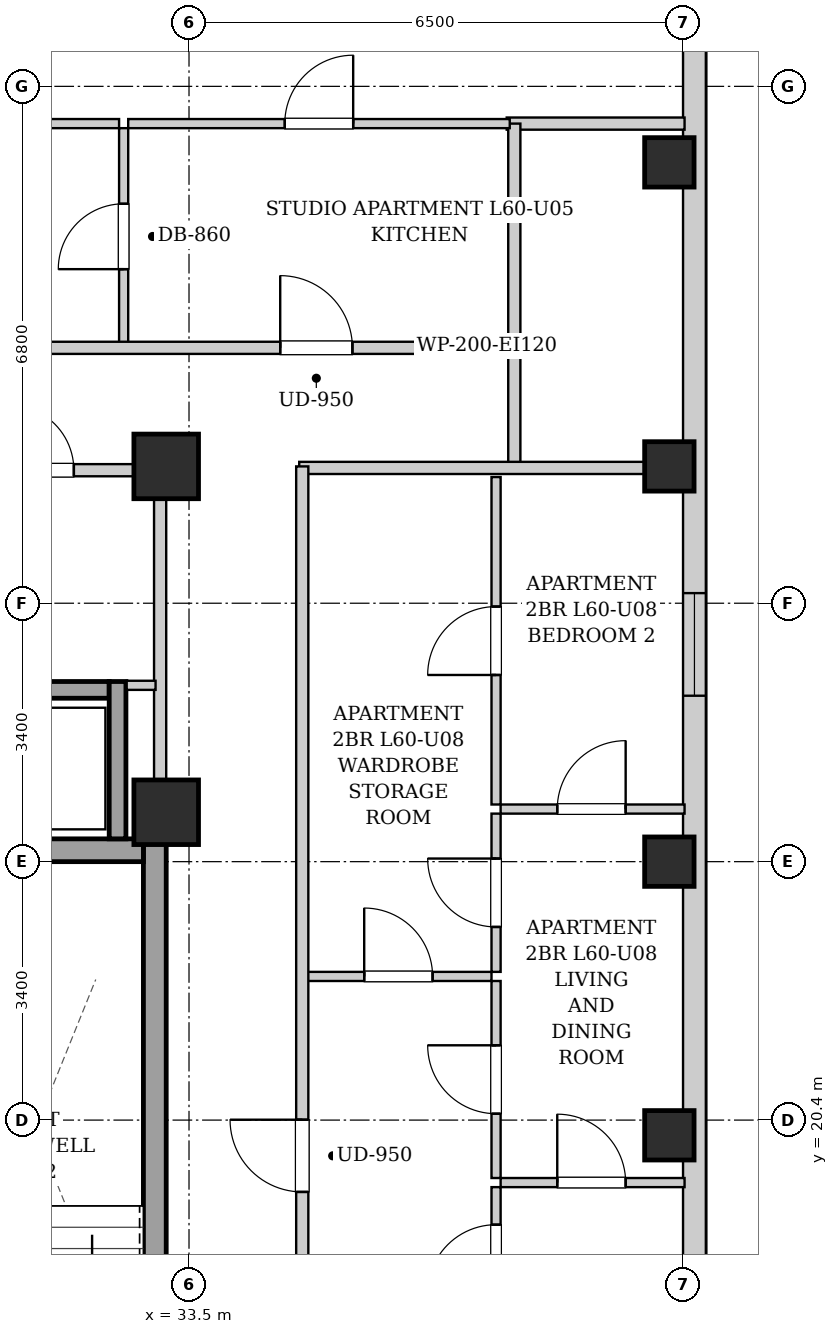
"""IFC4 building model, lengths in metres.
Left out: names, types, materials, properties, quantities, classifications, styles, units other than length and angle.
Written with IfcOpenShell. Run it as: python <this file> out.ifc"""

import sys

from ifc_helpers import new_model, si_unit, direction, frame, frame_2d, origin, origin_2d, place, context, subcontext, project, spatial, rectangle, extrude, element, fill, save


model = new_model("IFC4")
c1 = context("Model", 3, precision=1e-05, world=origin(), true_north=direction((0.0, 1.0)))
c2 = subcontext(c1, "Body", "Model", "MODEL_VIEW")
j1 = project(units=[si_unit("LENGTHUNIT", "METRE"), si_unit("PLANEANGLEUNIT", "RADIAN")], contexts=[c1])
p1 = place(None, origin())
s1 = spatial("IfcSite", under=j1, at=p1, CompositionType="ELEMENT")
p2 = place(p1, origin())
s2 = spatial("IfcBuilding", under=s1, at=p2, CompositionType="ELEMENT")
p3 = place(p2, frame((0.0, 0.0, 207.4)))
s3 = spatial("IfcBuildingStorey", under=s2, at=p3, CompositionType="ELEMENT", Elevation=207.4)
for number, where, z_axis, x_axis in (
    (1, (39.82, 20.2, 0.0), (0.0, 0.0, 1.0), (1.0, 0.0, 0.0)),
    (2, (39.82, 23.8, 0.0), (0.0, 0.0, 1.0), (1.0, 0.0, 0.0)),
    (3, (39.82, 29.0, 0.0), (0.0, 0.0, 1.0), (1.0, 0.0, 0.0)),
    (4, (39.82, 33.0, 0.0), (0.0, 0.0, 1.0), (1.0, 0.0, 0.0)),
):
    element("IfcColumn", number, at=place(p3, frame(where, z_axis=z_axis, x_axis=x_axis)), inside=s3, PredefinedType="COLUMN", context=c2, shape_type="SweptSolid", body=[
        extrude(rectangle(XDim=0.65, YDim=0.65, at=origin_2d()), origin(), (0.0, 0.0, 1.0), 3.3),
    ])
for number, where, z_axis, x_axis in (
    (5, (33.2, 29.0, 0.0), (0.0, 0.0, 1.0), (1.0, 0.0, 0.0)),
    (6, (33.2, 24.45, 0.0), (0.0, 0.0, 1.0), (1.0, 0.0, 0.0)),
):
    element("IfcColumn", number, at=place(p3, frame(where, z_axis=z_axis, x_axis=x_axis)), inside=s3, PredefinedType="COLUMN", context=c2, shape_type="SweptSolid", body=[
        extrude(rectangle(XDim=0.85, YDim=0.85, at=origin_2d()), origin(), (0.0, 0.0, 1.0), 3.3),
    ])
p4 = place(p3, frame((40.15, 37.7, 0.0), z_axis=(0.0, 0.0, 1.0), x_axis=(0.0, -1.0, 0.0)))
e7 = element("IfcWall", 7, at=p4, inside=s3, PredefinedType="SOLIDWALL", context=c2, shape_type="SweptSolid", body=[
    extrude(rectangle(XDim=31.4, YDim=0.3, at=frame_2d((15.7, 0.0))), origin(), (0.0, 0.0, 1.0), 3.04),
])
p5 = place(p4, frame((1.504, 0.0, 0.55)))
e8 = element("IfcOpeningElement", 8, at=p5, cuts=e7, PredefinedType="OPENING", context=c2, shape_type="SweptSolid", body=[
    extrude(rectangle(XDim=1.35, YDim=1.2, at=frame_2d((0.675, 0.6))), frame((0.0, 0.16, 0.0), z_axis=(0.0, -1.0, 0.0), x_axis=(1.0, 0.0, 0.0)), (0.0, 0.0, 1.0), 0.32),
])
p6 = place(p4, frame((19.683, 0.0, 0.55)))
e9 = element("IfcOpeningElement", 9, at=p6, cuts=e7, PredefinedType="OPENING", context=c2, shape_type="SweptSolid", body=[
    extrude(rectangle(XDim=1.35, YDim=1.2, at=frame_2d((0.675, 0.6))), frame((0.0, 0.16, 0.0), z_axis=(0.0, -1.0, 0.0), x_axis=(1.0, 0.0, 0.0)), (0.0, 0.0, 1.0), 0.32),
])
p7 = place(p4, frame((10.367, 0.0, 0.55)))
e10 = element("IfcOpeningElement", 10, at=p7, cuts=e7, PredefinedType="OPENING", context=c2, shape_type="SweptSolid", body=[
    extrude(rectangle(XDim=1.35, YDim=1.2, at=frame_2d((0.675, 0.6))), frame((0.0, 0.16, 0.0), z_axis=(0.0, -1.0, 0.0), x_axis=(1.0, 0.0, 0.0)), (0.0, 0.0, 1.0), 0.32),
])
p8 = place(p3, frame((33.05, 15.1, 0.0), z_axis=(0.0, 0.0, 1.0), x_axis=(0.0, 1.0, 0.0)))
e11 = element("IfcWall", 11, at=p8, inside=s3, PredefinedType="SHEAR", context=c2, shape_type="SweptSolid", body=[
    extrude(rectangle(XDim=9.0, YDim=0.3, at=frame_2d((4.5, 0.0))), origin(), (0.0, 0.0, 1.0), 3.04),
])
p9 = place(p3, frame((30.05, 23.95, 0.0), z_axis=(0.0, 0.0, 1.0), x_axis=(1.0, 0.0, 0.0)))
e12 = element("IfcWall", 12, at=p9, inside=s3, PredefinedType="SHEAR", context=c2, shape_type="SweptSolid", body=[
    extrude(rectangle(XDim=2.85, YDim=0.3, at=frame_2d((1.425, 0.0))), origin(), (0.0, 0.0, 1.0), 3.04),
])
p10 = place(p3, frame((30.55, 26.06, 0.0), z_axis=(0.0, 0.0, 1.0), x_axis=(1.0, 0.0, 0.0)))
e13 = element("IfcWall", 13, at=p10, inside=s3, PredefinedType="SHEAR", context=c2, shape_type="SweptSolid", body=[
    extrude(rectangle(XDim=1.9, YDim=0.22, at=frame_2d((0.95, 0.0))), origin(), (0.0, 0.0, 1.0), 3.04),
])
p11 = place(p3, frame((32.56, 24.1, 0.0), z_axis=(0.0, 0.0, 1.0), x_axis=(0.0, 1.0, 0.0)))
e14 = element("IfcWall", 14, at=p11, inside=s3, PredefinedType="SHEAR", context=c2, shape_type="SweptSolid", body=[
    extrude(rectangle(XDim=2.07, YDim=0.22, at=frame_2d((1.035, 0.0))), origin(), (0.0, 0.0, 1.0), 3.04),
])
p12 = place(p3, frame((33.12, 24.12, 0.0), z_axis=(0.0, 0.0, 1.0), x_axis=(0.0, 1.0, 0.0)))
e15 = element("IfcWall", 15, at=p12, inside=s3, PredefinedType="PARTITIONING", context=c2, shape_type="SweptSolid", body=[
    extrude(rectangle(XDim=4.76, YDim=0.16, at=frame_2d((2.38, 0.0))), origin(), (0.0, 0.0, 1.0), 2.375),
])
p13 = place(p3, frame((32.68, 26.12, 0.0), z_axis=(0.0, 0.0, 1.0), x_axis=(1.0, 0.0, 0.0)))
e16 = element("IfcWall", 16, at=p13, inside=s3, PredefinedType="PARTITIONING", context=c2, shape_type="SweptSolid", body=[
    extrude(rectangle(XDim=0.38, YDim=0.12, at=frame_2d((0.19, 0.0))), origin(), (0.0, 0.0, 1.0), 3.04),
])
p14 = place(p3, frame((30.08, 28.95, 0.0), z_axis=(0.0, 0.0, 1.0), x_axis=(1.0, 0.0, 0.0)))
e17 = element("IfcWall", 17, at=p14, inside=s3, PredefinedType="PARTITIONING", context=c2, shape_type="SweptSolid", body=[
    extrude(rectangle(XDim=2.96, YDim=0.16, at=frame_2d((1.48, 0.0))), origin(), (0.0, 0.0, 1.0), 3.04),
])
p15 = place(p14, frame((1.045, 0.0, 0.0)))
e18 = element("IfcOpeningElement", 18, at=p15, cuts=e17, PredefinedType="OPENING", context=c2, shape_type="SweptSolid", body=[
    extrude(rectangle(XDim=0.86, YDim=2.05, at=frame_2d((0.43, 1.025))), frame((0.0, 0.09, 0.0), z_axis=(0.0, -1.0, 0.0), x_axis=(1.0, 0.0, 0.0)), (0.0, 0.0, 1.0), 0.18),
])
p16 = place(p3, frame((37.78, 28.98, 0.0), z_axis=(0.0, 0.0, 1.0), x_axis=(0.0, 1.0, 0.0)))
e19 = element("IfcWall", 19, at=p16, inside=s3, PredefinedType="PARTITIONING", context=c2, shape_type="SweptSolid", body=[
    extrude(rectangle(XDim=1.58, YDim=0.16, at=frame_2d((0.79, 0.0))), origin(), (0.0, 0.0, 1.0), 3.04),
])
p17 = place(p3, frame((34.95, 28.98, 0.0), z_axis=(0.0, 0.0, 1.0), x_axis=(1.0, 0.0, 0.0)))
e20 = element("IfcWall", 20, at=p17, inside=s3, PredefinedType="PARTITIONING", context=c2, shape_type="SweptSolid", body=[
    extrude(rectangle(XDim=5.07, YDim=0.16, at=frame_2d((2.535, 0.0))), origin(), (0.0, 0.0, 1.0), 2.556),
])
p18 = place(p3, frame((37.68, 33.51, 0.0), z_axis=(0.0, 0.0, 1.0), x_axis=(1.0, 0.0, 0.0)))
e21 = element("IfcWall", 21, at=p18, inside=s3, PredefinedType="PARTITIONING", context=c2, shape_type="SweptSolid", body=[
    extrude(rectangle(XDim=2.34, YDim=0.16, at=frame_2d((1.17, 0.0))), origin(), (0.0, 0.0, 1.0), 3.04),
])
p19 = place(p3, frame((37.78, 30.6, 0.0), z_axis=(0.0, 0.0, 1.0), x_axis=(0.0, 1.0, 0.0)))
e22 = element("IfcWall", 22, at=p19, inside=s3, PredefinedType="PARTITIONING", context=c2, shape_type="SweptSolid", body=[
    extrude(rectangle(XDim=2.91, YDim=0.16, at=frame_2d((1.455, 0.0))), origin(), (0.0, 0.0, 1.0), 3.04),
])
p20 = place(p3, frame((32.64, 30.6, 0.0), z_axis=(0.0, 0.0, 1.0), x_axis=(0.0, 1.0, 0.0)))
e23 = element("IfcWall", 23, at=p20, inside=s3, PredefinedType="PARTITIONING", context=c2, shape_type="SweptSolid", body=[
    extrude(rectangle(XDim=2.85, YDim=0.12, at=frame_2d((1.425, 0.0))), origin(), (0.0, 0.0, 1.0), 3.04),
])
p21 = place(p20, frame((0.995, 0.0, 0.0)))
e24 = element("IfcOpeningElement", 24, at=p21, cuts=e23, PredefinedType="OPENING", context=c2, shape_type="SweptSolid", body=[
    extrude(rectangle(XDim=0.86, YDim=2.05, at=frame_2d((0.43, 1.025))), frame((0.0, 0.07, 0.0), z_axis=(0.0, -1.0, 0.0), x_axis=(1.0, 0.0, 0.0)), (0.0, 0.0, 1.0), 0.14),
])
p22 = place(p3, frame((30.377, 33.51, 0.0), z_axis=(0.0, 0.0, 1.0), x_axis=(1.0, 0.0, 0.0)))
e25 = element("IfcWall", 25, at=p22, inside=s3, PredefinedType="PARTITIONING", context=c2, shape_type="SweptSolid", body=[
    extrude(rectangle(XDim=2.203, YDim=0.12, at=frame_2d((1.102, 0.0))), origin(), (0.0, 0.0, 1.0), 3.04),
])
p23 = place(p3, frame((32.7, 33.51, 0.0), z_axis=(0.0, 0.0, 1.0), x_axis=(1.0, 0.0, 0.0)))
e26 = element("IfcWall", 26, at=p23, inside=s3, PredefinedType="PARTITIONING", context=c2, shape_type="SweptSolid", body=[
    extrude(rectangle(XDim=5.02, YDim=0.12, at=frame_2d((2.51, 0.0))), origin(), (0.0, 0.0, 1.0), 3.04),
])
p24 = place(p23, frame((2.06, 0.0, 0.0)))
e27 = element("IfcOpeningElement", 27, at=p24, cuts=e26, PredefinedType="OPENING", context=c2, shape_type="SweptSolid", body=[
    extrude(rectangle(XDim=0.9, YDim=2.05, at=frame_2d((0.45, 1.025))), frame((0.0, 0.07, 0.0), z_axis=(0.0, -1.0, 0.0), x_axis=(1.0, 0.0, 0.0)), (0.0, 0.0, 1.0), 0.14),
])
p25 = place(p3, frame((35.03, 22.29, 0.0), z_axis=(0.0, 0.0, 1.0), x_axis=(1.0, 0.0, 0.0)))
e28 = element("IfcWall", 28, at=p25, inside=s3, PredefinedType="PARTITIONING", context=c2, shape_type="SweptSolid", body=[
    extrude(rectangle(XDim=2.45, YDim=0.12, at=frame_2d((1.225, 0.0))), origin(), (0.0, 0.0, 1.0), 3.04),
])
p26 = place(p25, frame((0.775, 0.0, 0.0)))
e29 = element("IfcOpeningElement", 29, at=p26, cuts=e28, PredefinedType="OPENING", context=c2, shape_type="SweptSolid", body=[
    extrude(rectangle(XDim=0.9, YDim=2.05, at=frame_2d((0.45, 1.025))), frame((0.0, 0.07, 0.0), z_axis=(0.0, -1.0, 0.0), x_axis=(1.0, 0.0, 0.0)), (0.0, 0.0, 1.0), 0.14),
])
p27 = place(p3, frame((37.54, 22.35, 0.0), z_axis=(0.0, 0.0, 1.0), x_axis=(0.0, 1.0, 0.0)))
e30 = element("IfcWall", 30, at=p27, inside=s3, PredefinedType="PARTITIONING", context=c2, shape_type="SweptSolid", body=[
    extrude(rectangle(XDim=2.082, YDim=0.12, at=frame_2d((1.041, 0.0))), origin(), (0.0, 0.0, 1.0), 3.04),
])
p28 = place(p27, frame((0.591, 0.0, 0.0)))
e31 = element("IfcOpeningElement", 31, at=p28, cuts=e30, PredefinedType="OPENING", context=c2, shape_type="SweptSolid", body=[
    extrude(rectangle(XDim=0.9, YDim=2.05, at=frame_2d((0.45, 1.025))), frame((0.0, 0.07, 0.0), z_axis=(0.0, -1.0, 0.0), x_axis=(1.0, 0.0, 0.0)), (0.0, 0.0, 1.0), 0.14),
])
p29 = place(p3, frame((37.54, 24.552, 0.0), z_axis=(0.0, 0.0, 1.0), x_axis=(0.0, 1.0, 0.0)))
e32 = element("IfcWall", 32, at=p29, inside=s3, PredefinedType="PARTITIONING", context=c2, shape_type="SweptSolid", body=[
    extrude(rectangle(XDim=4.308, YDim=0.12, at=frame_2d((2.154, 0.0))), origin(), (0.0, 0.0, 1.0), 3.04),
])
p30 = place(p29, frame((1.704, 0.0, 0.0)))
e33 = element("IfcOpeningElement", 33, at=p30, cuts=e32, PredefinedType="OPENING", context=c2, shape_type="SweptSolid", body=[
    extrude(rectangle(XDim=0.9, YDim=2.05, at=frame_2d((0.45, 1.025))), frame((0.0, 0.07, 0.0), z_axis=(0.0, -1.0, 0.0), x_axis=(1.0, 0.0, 0.0)), (0.0, 0.0, 1.0), 0.14),
])
p31 = place(p3, frame((37.54, 17.63, 0.0), z_axis=(0.0, 0.0, 1.0), x_axis=(0.0, 1.0, 0.0)))
e34 = element("IfcWall", 34, at=p31, inside=s3, PredefinedType="PARTITIONING", context=c2, shape_type="SweptSolid", body=[
    extrude(rectangle(XDim=1.888, YDim=0.12, at=frame_2d((0.944, 0.0))), origin(), (0.0, 0.0, 1.0), 3.04),
])
p32 = place(p31, frame((0.494, 0.0, 0.0)))
e35 = element("IfcOpeningElement", 35, at=p32, cuts=e34, PredefinedType="OPENING", context=c2, shape_type="SweptSolid", body=[
    extrude(rectangle(XDim=0.9, YDim=2.05, at=frame_2d((0.45, 1.025))), frame((0.0, 0.07, 0.0), z_axis=(0.0, -1.0, 0.0), x_axis=(1.0, 0.0, 0.0)), (0.0, 0.0, 1.0), 0.14),
])
p33 = place(p3, frame((37.54, 19.638, 0.0), z_axis=(0.0, 0.0, 1.0), x_axis=(0.0, 1.0, 0.0)))
e36 = element("IfcWall", 36, at=p33, inside=s3, PredefinedType="PARTITIONING", context=c2, shape_type="SweptSolid", body=[
    extrude(rectangle(XDim=2.592, YDim=0.12, at=frame_2d((1.296, 0.0))), origin(), (0.0, 0.0, 1.0), 3.04),
])
p34 = place(p33, frame((0.846, 0.0, 0.0)))
e37 = element("IfcOpeningElement", 37, at=p34, cuts=e36, PredefinedType="OPENING", context=c2, shape_type="SweptSolid", body=[
    extrude(rectangle(XDim=0.9, YDim=2.05, at=frame_2d((0.45, 1.025))), frame((0.0, 0.07, 0.0), z_axis=(0.0, -1.0, 0.0), x_axis=(1.0, 0.0, 0.0)), (0.0, 0.0, 1.0), 0.14),
])
p35 = place(p3, frame((37.6, 19.578, 0.0), z_axis=(0.0, 0.0, 1.0), x_axis=(1.0, 0.0, 0.0)))
e38 = element("IfcWall", 38, at=p35, inside=s3, PredefinedType="PARTITIONING", context=c2, shape_type="SweptSolid", body=[
    extrude(rectangle(XDim=2.42, YDim=0.12, at=frame_2d((1.21, 0.0))), origin(), (0.0, 0.0, 1.0), 3.04),
])
p36 = place(p35, frame((0.745, 0.0, 0.0)))
e39 = element("IfcOpeningElement", 39, at=p36, cuts=e38, PredefinedType="OPENING", context=c2, shape_type="SweptSolid", body=[
    extrude(rectangle(XDim=0.9, YDim=2.05, at=frame_2d((0.45, 1.025))), frame((0.0, 0.07, 0.0), z_axis=(0.0, -1.0, 0.0), x_axis=(1.0, 0.0, 0.0)), (0.0, 0.0, 1.0), 0.14),
])
p37 = place(p3, frame((37.6, 24.492, 0.0), z_axis=(0.0, 0.0, 1.0), x_axis=(1.0, 0.0, 0.0)))
e40 = element("IfcWall", 40, at=p37, inside=s3, PredefinedType="PARTITIONING", context=c2, shape_type="SweptSolid", body=[
    extrude(rectangle(XDim=2.42, YDim=0.12, at=frame_2d((1.21, 0.0))), origin(), (0.0, 0.0, 1.0), 2.722),
])
p38 = place(p37, frame((0.745, 0.0, 0.0)))
e41 = element("IfcOpeningElement", 41, at=p38, cuts=e40, PredefinedType="OPENING", context=c2, shape_type="SweptSolid", body=[
    extrude(rectangle(XDim=0.9, YDim=2.05, at=frame_2d((0.45, 1.025))), frame((0.0, 0.07, 0.0), z_axis=(0.0, -1.0, 0.0), x_axis=(1.0, 0.0, 0.0)), (0.0, 0.0, 1.0), 0.14),
])
p39 = place(p3, frame((13.15, 30.56, 0.0), z_axis=(0.0, 0.0, 1.0), x_axis=(1.0, 0.0, 0.0)))
e42 = element("IfcWall", 42, at=p39, inside=s3, PredefinedType="PARTITIONING", context=c2, shape_type="SweptSolid", body=[
    extrude(rectangle(XDim=24.6, YDim=0.16, at=frame_2d((12.3, 0.0))), origin(), (0.0, 0.0, 1.0), 3.04),
])
p40 = place(p39, frame((3.115, 0.0, 0.0)))
e43 = element("IfcOpeningElement", 43, at=p40, cuts=e42, PredefinedType="OPENING", context=c2, shape_type="SweptSolid", body=[
    extrude(rectangle(XDim=0.95, YDim=2.1, at=frame_2d((0.475, 1.05))), frame((0.0, 0.09, 0.0), z_axis=(0.0, -1.0, 0.0), x_axis=(1.0, 0.0, 0.0)), (0.0, 0.0, 1.0), 0.18),
])
p41 = place(p39, frame((21.55, 0.0, 0.0)))
e44 = element("IfcOpeningElement", 44, at=p41, cuts=e42, PredefinedType="OPENING", context=c2, shape_type="SweptSolid", body=[
    extrude(rectangle(XDim=0.95, YDim=2.1, at=frame_2d((0.475, 1.05))), frame((0.0, 0.09, 0.0), z_axis=(0.0, -1.0, 0.0), x_axis=(1.0, 0.0, 0.0)), (0.0, 0.0, 1.0), 0.18),
])
p42 = place(p3, frame((34.99, 15.07, 0.0), z_axis=(0.0, 0.0, 1.0), x_axis=(0.0, 1.0, 0.0)))
e45 = element("IfcWall", 45, at=p42, inside=s3, PredefinedType="PARTITIONING", context=c2, shape_type="SweptSolid", body=[
    extrude(rectangle(XDim=13.93, YDim=0.16, at=frame_2d((6.965, 0.0))), origin(), (0.0, 0.0, 1.0), 3.04),
])
p43 = place(p42, frame((4.385, 0.0, 0.0)))
e46 = element("IfcOpeningElement", 46, at=p43, cuts=e45, PredefinedType="OPENING", context=c2, shape_type="SweptSolid", body=[
    extrude(rectangle(XDim=0.95, YDim=2.1, at=frame_2d((0.475, 1.05))), frame((0.0, 0.09, 0.0), z_axis=(0.0, -1.0, 0.0), x_axis=(1.0, 0.0, 0.0)), (0.0, 0.0, 1.0), 0.18),
])
p44 = place(p15, origin())
e47 = element("IfcDoor", 47, at=p44, inside=s3, OperationType="SINGLE_SWING_LEFT", PredefinedType="DOOR", context=c2, shape_type="SweptSolid", body=[
    extrude(rectangle(XDim=0.86, YDim=2.05, at=frame_2d((0.43, 1.025))), frame((0.0, 0.025, 0.0), z_axis=(0.0, -1.0, 0.0), x_axis=(1.0, 0.0, 0.0)), (0.0, 0.0, 1.0), 0.05),
])
fill(e18, e47)
p45 = place(p21, origin())
e48 = element("IfcDoor", 48, at=p45, inside=s3, OperationType="SINGLE_SWING_LEFT", PredefinedType="DOOR", context=c2, shape_type="SweptSolid", body=[
    extrude(rectangle(XDim=0.86, YDim=2.05, at=frame_2d((0.43, 1.025))), frame((0.0, 0.025, 0.0), z_axis=(0.0, -1.0, 0.0), x_axis=(1.0, 0.0, 0.0)), (0.0, 0.0, 1.0), 0.05),
])
fill(e24, e48)
p46 = place(p24, origin())
e49 = element("IfcDoor", 49, at=p46, inside=s3, OperationType="SINGLE_SWING_RIGHT", PredefinedType="DOOR", context=c2, shape_type="SweptSolid", body=[
    extrude(rectangle(XDim=0.9, YDim=2.05, at=frame_2d((0.45, 1.025))), frame((0.0, 0.025, 0.0), z_axis=(0.0, -1.0, 0.0), x_axis=(1.0, 0.0, 0.0)), (0.0, 0.0, 1.0), 0.05),
])
fill(e27, e49)
p47 = place(p26, origin())
e50 = element("IfcDoor", 50, at=p47, inside=s3, OperationType="SINGLE_SWING_LEFT", PredefinedType="DOOR", context=c2, shape_type="SweptSolid", body=[
    extrude(rectangle(XDim=0.9, YDim=2.05, at=frame_2d((0.45, 1.025))), frame((0.0, 0.025, 0.0), z_axis=(0.0, -1.0, 0.0), x_axis=(1.0, 0.0, 0.0)), (0.0, 0.0, 1.0), 0.05),
])
fill(e29, e50)
p48 = place(p28, origin())
e51 = element("IfcDoor", 51, at=p48, inside=s3, OperationType="SINGLE_SWING_RIGHT", PredefinedType="DOOR", context=c2, shape_type="SweptSolid", body=[
    extrude(rectangle(XDim=0.9, YDim=2.05, at=frame_2d((0.45, 1.025))), frame((0.0, 0.025, 0.0), z_axis=(0.0, -1.0, 0.0), x_axis=(1.0, 0.0, 0.0)), (0.0, 0.0, 1.0), 0.05),
])
fill(e31, e51)
p49 = place(p30, origin())
e52 = element("IfcDoor", 52, at=p49, inside=s3, OperationType="SINGLE_SWING_LEFT", PredefinedType="DOOR", context=c2, shape_type="SweptSolid", body=[
    extrude(rectangle(XDim=0.9, YDim=2.05, at=frame_2d((0.45, 1.025))), frame((0.0, 0.025, 0.0), z_axis=(0.0, -1.0, 0.0), x_axis=(1.0, 0.0, 0.0)), (0.0, 0.0, 1.0), 0.05),
])
fill(e33, e52)
p50 = place(p32, origin())
e53 = element("IfcDoor", 53, at=p50, inside=s3, OperationType="SINGLE_SWING_LEFT", PredefinedType="DOOR", context=c2, shape_type="SweptSolid", body=[
    extrude(rectangle(XDim=0.9, YDim=2.05, at=frame_2d((0.45, 1.025))), frame((0.0, 0.025, 0.0), z_axis=(0.0, -1.0, 0.0), x_axis=(1.0, 0.0, 0.0)), (0.0, 0.0, 1.0), 0.05),
])
fill(e35, e53)
p51 = place(p34, origin())
e54 = element("IfcDoor", 54, at=p51, inside=s3, OperationType="SINGLE_SWING_RIGHT", PredefinedType="DOOR", context=c2, shape_type="SweptSolid", body=[
    extrude(rectangle(XDim=0.9, YDim=2.05, at=frame_2d((0.45, 1.025))), frame((0.0, 0.025, 0.0), z_axis=(0.0, -1.0, 0.0), x_axis=(1.0, 0.0, 0.0)), (0.0, 0.0, 1.0), 0.05),
])
fill(e37, e54)
p52 = place(p36, origin())
e55 = element("IfcDoor", 55, at=p52, inside=s3, OperationType="SINGLE_SWING_LEFT", PredefinedType="DOOR", context=c2, shape_type="SweptSolid", body=[
    extrude(rectangle(XDim=0.9, YDim=2.05, at=frame_2d((0.45, 1.025))), frame((0.0, 0.025, 0.0), z_axis=(0.0, -1.0, 0.0), x_axis=(1.0, 0.0, 0.0)), (0.0, 0.0, 1.0), 0.05),
])
fill(e39, e55)
p53 = place(p38, origin())
e56 = element("IfcDoor", 56, at=p53, inside=s3, OperationType="SINGLE_SWING_RIGHT", PredefinedType="DOOR", context=c2, shape_type="SweptSolid", body=[
    extrude(rectangle(XDim=0.9, YDim=2.05, at=frame_2d((0.45, 1.025))), frame((0.0, 0.025, 0.0), z_axis=(0.0, -1.0, 0.0), x_axis=(1.0, 0.0, 0.0)), (0.0, 0.0, 1.0), 0.05),
])
fill(e41, e56)
p54 = place(p41, origin())
e57 = element("IfcDoor", 57, at=p54, inside=s3, OperationType="SINGLE_SWING_LEFT", PredefinedType="DOOR", context=c2, shape_type="SweptSolid", body=[
    extrude(rectangle(XDim=0.95, YDim=2.1, at=frame_2d((0.475, 1.05))), frame((0.0, 0.025, 0.0), z_axis=(0.0, -1.0, 0.0), x_axis=(1.0, 0.0, 0.0)), (0.0, 0.0, 1.0), 0.05),
])
fill(e44, e57)
p55 = place(p43, origin())
e58 = element("IfcDoor", 58, at=p55, inside=s3, OperationType="SINGLE_SWING_RIGHT", PredefinedType="DOOR", context=c2, shape_type="SweptSolid", body=[
    extrude(rectangle(XDim=0.95, YDim=2.1, at=frame_2d((0.475, 1.05))), frame((0.0, 0.025, 0.0), z_axis=(0.0, -1.0, 0.0), x_axis=(1.0, 0.0, 0.0)), (0.0, 0.0, 1.0), 0.05),
])
fill(e46, e58)
p56 = place(p7, origin())
e59 = element("IfcWindow", 59, at=p56, inside=s3, PartitioningType="SINGLE_PANEL", PredefinedType="WINDOW", context=c2, shape_type="SweptSolid", body=[
    extrude(rectangle(XDim=1.35, YDim=1.2, at=frame_2d((0.675, 0.6))), frame((0.0, 0.03, 0.0), z_axis=(0.0, -1.0, 0.0), x_axis=(1.0, 0.0, 0.0)), (0.0, 0.0, 1.0), 0.06),
])
fill(e10, e59)
save(model, sys.argv[1])
